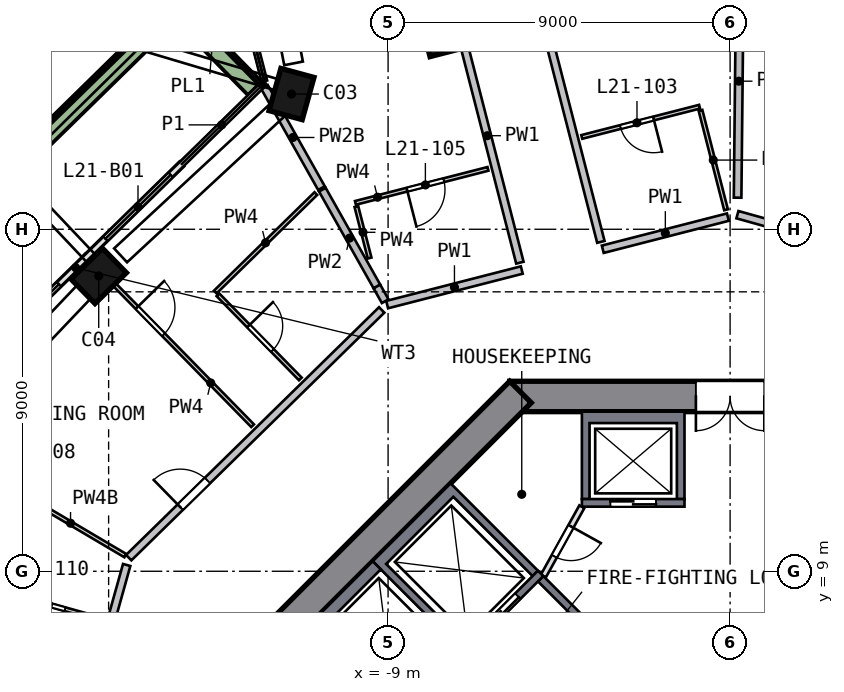
"""IFC4 building model, lengths in metres.
Left out: names, types, materials, properties, quantities, classifications, styles, units other than length and angle.
Written with IfcOpenShell. Run it as: python <this file> out.ifc"""

import sys

from ifc_helpers import new_model, si_unit, direction, frame, frame_2d, origin, origin_2d, place, context, subcontext, project, spatial, polyline, rectangle, outline, extrude, element, fill, save


model = new_model("IFC4")
c1 = context("Model", 3, precision=1e-05, world=origin(), true_north=direction((0.0, 1.0)))
c2 = subcontext(c1, "Body", "Model", "MODEL_VIEW")
j1 = project(units=[si_unit("LENGTHUNIT", "METRE"), si_unit("PLANEANGLEUNIT", "RADIAN")], contexts=[c1])
p1 = place(None, origin())
s1 = spatial("IfcSite", under=j1, at=p1, CompositionType="ELEMENT")
p2 = place(p1, origin())
s2 = spatial("IfcBuilding", under=s1, at=p2, CompositionType="ELEMENT")
p3 = place(p2, frame((0.0, 0.0, 93.0)))
s3 = spatial("IfcBuildingStorey", under=s2, at=p3, CompositionType="ELEMENT", Elevation=93.0)
p4 = place(p3, frame((-11.417, 21.625, 0.0), z_axis=(-0.102392644, -0.055111111, 0.993216246), x_axis=(0.261860197, 0.961754302, 0.080361056)))
e1 = element("IfcColumn", 1, at=p4, inside=s3, PredefinedType="COLUMN", context=c2, shape_type="SweptSolid", body=[
    extrude(rectangle(XDim=1.15, YDim=0.9, at=origin_2d()), origin(), (0.0, 0.0, 1.0), 3.212),
])
p5 = place(p3, frame((-16.518, 16.867, 0.0), z_axis=(-0.079548847, -0.079244645, 0.993676138), x_axis=(-0.709905463, -0.695289434, -0.11228017)))
e2 = element("IfcColumn", 2, at=p5, inside=s3, PredefinedType="COLUMN", context=c2, shape_type="SweptSolid", body=[
    extrude(rectangle(XDim=1.15, YDim=0.9, at=origin_2d()), origin(), (0.0, 0.0, 1.0), 3.21),
])
p6 = place(p3, frame((-7.437, 23.135, 0.0), z_axis=(-0.109699705, -0.03626248, 0.993303079), x_axis=(-0.249411802, 0.968366047, 0.007807238)))
e3 = element("IfcColumn", 3, at=p6, inside=s3, PredefinedType="COLUMN", context=c2, shape_type="SweptSolid", body=[
    extrude(rectangle(XDim=0.9, YDim=0.9, at=origin_2d()), origin(), (0.0, 0.0, 1.0), 3.211),
])
p7 = place(p3, frame((5.799, 13.6, 0.0), z_axis=(0.0, 0.0, 1.0), x_axis=(-1.0, 0.0, 0.0)))
e4 = element("IfcWall", 4, at=p7, inside=s3, PredefinedType="SHEAR", context=c2, shape_type="SweptSolid", body=[
    extrude(rectangle(XDim=11.598, YDim=0.8, at=frame_2d((5.799, 0.0))), origin(), (0.0, 0.0, 1.0), 3.5),
])
p8 = place(p7, frame((4.899, 0.0, 0.0)))
e5 = element("IfcOpeningElement", 5, at=p8, cuts=e4, PredefinedType="OPENING", context=c2, shape_type="SweptSolid", body=[
    extrude(rectangle(XDim=1.8, YDim=2.1, at=frame_2d((0.9, 1.05))), frame((0.0, 0.41, 0.0), z_axis=(0.0, -1.0, 0.0), x_axis=(1.0, 0.0, 0.0)), (0.0, 0.0, 1.0), 0.82),
])
p9 = place(p3, frame((-5.516, 13.717, 0.0), z_axis=(0.0, 0.0, 1.0), x_axis=(-0.707106781, -0.707106781, 0.0)))
e6 = element("IfcWall", 6, at=p9, inside=s3, PredefinedType="SHEAR", context=c2, shape_type="SweptSolid", body=[
    extrude(rectangle(XDim=11.598, YDim=0.8, at=frame_2d((5.799, 0.0))), origin(), (0.0, 0.0, 1.0), 3.5),
])
p10 = place(p3, frame((-14.438, 19.71, 0.0), z_axis=(0.0, 0.0, 1.0), x_axis=(-0.714445304, -0.699691295, 0.0)))
e7 = element("IfcWall", 7, at=p10, inside=s3, PredefinedType="SOLIDWALL", context=c2, shape_type="SweptSolid", body=[
    extrude(rectangle(XDim=3.475, YDim=0.15, at=frame_2d((1.737, 0.0))), origin(), (0.0, 0.0, 1.0), 2.425),
])
p11 = place(p10, frame((0.4, 0.0, 0.0)))
e8 = element("IfcOpeningElement", 8, at=p11, cuts=e7, PredefinedType="OPENING", context=c2, shape_type="SweptSolid", body=[
    extrude(rectangle(XDim=2.4, YDim=2.4, at=frame_2d((1.2, 1.2))), frame((0.0, 0.085, 0.0), z_axis=(0.0, -1.0, 0.0), x_axis=(1.0, 0.0, 0.0)), (0.0, 0.0, 1.0), 0.17),
])
p12 = place(p3, frame((-16.92, 17.278, 0.0), z_axis=(0.0, 0.0, 1.0), x_axis=(-0.714483248, -0.699652549, 0.0)))
e9 = element("IfcWall", 9, at=p12, inside=s3, PredefinedType="SOLIDWALL", context=c2, shape_type="SweptSolid", body=[
    extrude(rectangle(XDim=3.836, YDim=0.15, at=frame_2d((1.918, 0.0))), origin(), (0.0, 0.0, 1.0), 2.425),
])
p13 = place(p12, frame((1.035, 0.0, 0.0)))
e10 = element("IfcOpeningElement", 10, at=p13, cuts=e9, PredefinedType="OPENING", context=c2, shape_type="SweptSolid", body=[
    extrude(rectangle(XDim=2.4, YDim=2.4, at=frame_2d((1.2, 1.2))), frame((0.0, 0.085, 0.0), z_axis=(0.0, -1.0, 0.0), x_axis=(1.0, 0.0, 0.0)), (0.0, 0.0, 1.0), 0.17),
])
p14 = place(p3, frame((-12.508, 21.706, 0.0), z_axis=(0.0, 0.0, 1.0), x_axis=(-0.699665376, 0.714470686, 0.0)))
e11 = element("IfcWall", 11, at=p14, inside=s3, PredefinedType="SOLIDWALL", context=c2, shape_type="SweptSolid", body=[
    extrude(rectangle(XDim=3.199, YDim=0.5, at=frame_2d((1.6, 0.0))), origin(), (0.0, 0.0, 1.0), 0.7),
])
p15 = place(p3, frame((-14.75, 23.638, 0.0), z_axis=(0.0, 0.0, 1.0), x_axis=(-0.714471394, -0.699664653, 0.0)))
e12 = element("IfcWall", 12, at=p15, inside=s3, PredefinedType="SOLIDWALL", context=c2, shape_type="SweptSolid", body=[
    extrude(rectangle(XDim=13.224, YDim=0.5, at=frame_2d((6.612, 0.0))), origin(), (0.0, 0.0, 1.0), 0.7),
])
p16 = place(p3, origin())
e13 = element("IfcWall", 13, at=p16, inside=s3, PredefinedType="SOLIDWALL", context=c2, shape_type="SweptSolid", body=[
    extrude(outline(polyline([(-3.9, 10.9), (-3.9, 13.2), (-1.2, 13.2), (-1.2, 10.9), (-1.4, 10.9), (-1.4, 12.9), (-3.7, 12.9), (-3.7, 10.9), (-3.9, 10.9)])), origin(), (0.0, 0.0, 1.0), 3.19),
])
p17 = place(p3, frame((-1.2, 10.8, 0.0), z_axis=(0.0, 0.0, 1.0), x_axis=(-1.0, 0.0, 0.0)))
e14 = element("IfcWall", 14, at=p17, inside=s3, PredefinedType="SOLIDWALL", context=c2, shape_type="SweptSolid", body=[
    extrude(rectangle(XDim=2.7, YDim=0.2, at=frame_2d((1.35, 0.0))), origin(), (0.0, 0.0, 1.0), 3.19),
])
p18 = place(p17, frame((0.75, 0.0, 0.0)))
e15 = element("IfcOpeningElement", 15, at=p18, cuts=e14, PredefinedType="OPENING", context=c2, shape_type="SweptSolid", body=[
    extrude(rectangle(XDim=1.2, YDim=2.1, at=frame_2d((0.6, 1.05))), frame((0.0, 0.11, 0.0), z_axis=(0.0, -1.0, 0.0), x_axis=(1.0, 0.0, 0.0)), (0.0, 0.0, 1.0), 0.22),
])
p19 = place(p3, origin())
e16 = element("IfcWall", 16, at=p19, inside=s3, PredefinedType="SOLIDWALL", context=c2, shape_type="SweptSolid", body=[
    extrude(outline(polyline([(-9.405, 9.263), (-7.354, 11.314), (-5.056, 9.016), (-5.197, 8.874), (-7.283, 10.96), (-9.051, 9.192), (-6.965, 7.106), (-7.106, 6.965), (-9.405, 9.263)])), origin(), (0.0, 0.0, 1.0), 3.19),
])
p20 = place(p3, frame((-4.985, 8.945, 0.0), z_axis=(0.0, 0.0, 1.0), x_axis=(-0.707106781, -0.707106781, 0.0)))
e17 = element("IfcWall", 17, at=p20, inside=s3, PredefinedType="SOLIDWALL", context=c2, shape_type="SweptSolid", body=[
    extrude(rectangle(XDim=2.9, YDim=0.2, at=frame_2d((1.45, 0.0))), origin(), (0.0, 0.0, 1.0), 3.19),
])
p21 = place(p20, frame((0.85, 0.0, 0.0)))
e18 = element("IfcOpeningElement", 18, at=p21, cuts=e17, PredefinedType="OPENING", context=c2, shape_type="SweptSolid", body=[
    extrude(rectangle(XDim=1.2, YDim=2.1, at=frame_2d((0.6, 1.05))), frame((0.0, 0.11, 0.0), z_axis=(0.0, -1.0, 0.0), x_axis=(1.0, 0.0, 0.0)), (0.0, 0.0, 1.0), 0.22),
])
p22 = place(p3, origin())
e19 = element("IfcWall", 19, at=p22, inside=s3, PredefinedType="SOLIDWALL", context=c2, shape_type="SweptSolid", body=[
    extrude(outline(polyline([(-11.314, 7.354), (-9.405, 9.263), (-9.192, 9.051), (-10.96, 7.283), (-8.874, 5.197), (-9.016, 5.056), (-11.314, 7.354)])), origin(), (0.0, 0.0, 1.0), 3.19),
])
p23 = place(p3, frame((-3.005, 6.823, 0.0), z_axis=(0.0, 0.0, 1.0), x_axis=(-0.707106781, 0.707106781, 0.0)))
e20 = element("IfcWall", 20, at=p23, inside=s3, PredefinedType="SOLIDWALL", context=c2, shape_type="SweptSolid", body=[
    extrude(rectangle(XDim=2.8, YDim=0.2, at=frame_2d((1.4, 0.0))), origin(), (0.0, 0.0, 1.0), 3.19),
])
p24 = place(p3, frame((-3.9, 10.7, 0.0), z_axis=(0.0, 0.0, 1.0), x_axis=(-0.485692555, -0.874129705, 0.0)))
e21 = element("IfcWall", 21, at=p24, inside=s3, PredefinedType="PARTITIONING", context=c2, shape_type="SweptSolid", body=[
    extrude(rectangle(XDim=2.089, YDim=0.15, at=frame_2d((1.044, 0.0))), origin(), (0.0, 0.0, 1.0), 3.19),
])
p25 = place(p24, frame((0.594, 0.0, 0.0)))
e22 = element("IfcOpeningElement", 22, at=p25, cuts=e21, PredefinedType="OPENING", context=c2, shape_type="SweptSolid", body=[
    extrude(rectangle(XDim=0.9, YDim=2.1, at=frame_2d((0.45, 1.05))), frame((0.0, 0.085, 0.0), z_axis=(0.0, -1.0, 0.0), x_axis=(1.0, 0.0, 0.0)), (0.0, 0.0, 1.0), 0.17),
])
p26 = place(p3, frame((-18.33, 0.386, 0.0), z_axis=(0.0, 0.0, 1.0), x_axis=(0.268911641, 0.96316485, 0.0)))
e23 = element("IfcWall", 23, at=p26, inside=s3, PredefinedType="SOLIDWALL", context=c2, shape_type="SweptSolid", body=[
    extrude(rectangle(XDim=9.116, YDim=0.2, at=frame_2d((4.558, 0.0))), origin(), (0.0, 0.0, 1.0), 3.19),
])
p27 = place(p26, frame((0.2, 0.0, 0.0)))
e24 = element("IfcOpeningElement", 24, at=p27, cuts=e23, PredefinedType="OPENING", context=c2, shape_type="SweptSolid", body=[
    extrude(rectangle(XDim=1.0, YDim=2.1, at=frame_2d((0.5, 1.05))), frame((0.0, 0.11, 0.0), z_axis=(0.0, -1.0, 0.0), x_axis=(1.0, 0.0, 0.0)), (0.0, 0.0, 1.0), 0.22),
])
p28 = place(p3, frame((-15.824, 9.359, 0.0), z_axis=(0.0, 0.0, 1.0), x_axis=(0.714458026, 0.699678304, 0.0)))
e25 = element("IfcWall", 25, at=p28, inside=s3, PredefinedType="SOLIDWALL", context=c2, shape_type="SweptSolid", body=[
    extrude(rectangle(XDim=9.316, YDim=0.2, at=frame_2d((4.658, 0.0))), origin(), (0.0, 0.0, 1.0), 3.19),
])
p29 = place(p28, frame((1.9, 0.0, 0.0)))
e26 = element("IfcOpeningElement", 26, at=p29, cuts=e25, PredefinedType="OPENING", context=c2, shape_type="SweptSolid", body=[
    extrude(rectangle(XDim=1.0, YDim=2.1, at=frame_2d((0.5, 1.05))), frame((0.0, 0.11, 0.0), z_axis=(0.0, -1.0, 0.0), x_axis=(1.0, 0.0, 0.0)), (0.0, 0.0, 1.0), 0.22),
])
p30 = place(p3, frame((-5.482, 16.927, 0.0), z_axis=(0.0, 0.0, 1.0), x_axis=(-0.968576117, -0.24871732, 0.0)))
e27 = element("IfcWall", 27, at=p30, inside=s3, PredefinedType="SOLIDWALL", context=c2, shape_type="SweptSolid", body=[
    extrude(rectangle(XDim=3.658, YDim=0.2, at=frame_2d((1.829, 0.0))), origin(), (0.0, 0.0, 1.0), 3.19),
])
p31 = place(p3, frame((-5.531, 17.121, 0.0), z_axis=(0.0, 0.0, 1.0), x_axis=(-0.24868755, 0.968583761, 0.0)))
e28 = element("IfcWall", 28, at=p31, inside=s3, PredefinedType="SOLIDWALL", context=c2, shape_type="SweptSolid", body=[
    extrude(rectangle(XDim=12.624, YDim=0.2, at=frame_2d((6.312, 0.0))), origin(), (0.0, 0.0, 1.0), 3.19),
])
p32 = place(p31, frame((7.1, 0.0, 0.0)))
e29 = element("IfcOpeningElement", 29, at=p32, cuts=e28, PredefinedType="OPENING", context=c2, shape_type="SweptSolid", body=[
    extrude(rectangle(XDim=1.0, YDim=2.1, at=frame_2d((0.5, 1.05))), frame((0.0, 0.11, 0.0), z_axis=(0.0, -1.0, 0.0), x_axis=(1.0, 0.0, 0.0)), (0.0, 0.0, 1.0), 0.22),
])
p33 = place(p3, frame((-3.401, 17.668, 0.0), z_axis=(0.0, 0.0, 1.0), x_axis=(-0.24868755, 0.968583761, 0.0)))
e30 = element("IfcWall", 30, at=p33, inside=s3, PredefinedType="SOLIDWALL", context=c2, shape_type="SweptSolid", body=[
    extrude(rectangle(XDim=12.624, YDim=0.2, at=frame_2d((6.312, 0.0))), origin(), (0.0, 0.0, 1.0), 3.19),
])
p34 = place(p3, frame((-0.058, 18.32, 0.0), z_axis=(0.0, 0.0, 1.0), x_axis=(-0.968589847, -0.248663847, 0.0)))
e31 = element("IfcWall", 31, at=p34, inside=s3, PredefinedType="SOLIDWALL", context=c2, shape_type="SweptSolid", body=[
    extrude(rectangle(XDim=3.4, YDim=0.2, at=frame_2d((1.7, 0.0))), origin(), (0.0, 0.0, 1.0), 3.19),
])
p35 = place(p3, frame((0.193, 18.384, 0.0), z_axis=(0.0, 0.0, 1.0), x_axis=(0.963159453, -0.268930974, 0.0)))
e32 = element("IfcWall", 32, at=p35, inside=s3, PredefinedType="SOLIDWALL", context=c2, shape_type="SweptSolid", body=[
    extrude(rectangle(XDim=9.537, YDim=0.2, at=frame_2d((4.768, 0.0))), origin(), (0.0, 0.0, 1.0), 3.19),
])
p36 = place(p35, frame((5.1, 0.0, 0.0)))
e33 = element("IfcOpeningElement", 33, at=p36, cuts=e32, PredefinedType="OPENING", context=c2, shape_type="SweptSolid", body=[
    extrude(rectangle(XDim=1.0, YDim=2.1, at=frame_2d((0.5, 1.05))), frame((0.0, 0.11, 0.0), z_axis=(0.0, -1.0, 0.0), x_axis=(1.0, 0.0, 0.0)), (0.0, 0.0, 1.0), 0.22),
])
p37 = place(p3, frame((-10.752, 19.082, 0.0), z_axis=(0.0, 0.0, 1.0), x_axis=(-0.490847997, 0.871245226, 0.0)))
e34 = element("IfcWall", 34, at=p37, inside=s3, PredefinedType="SOLIDWALL", context=c2, shape_type="SweptSolid", body=[
    extrude(rectangle(XDim=3.062, YDim=0.2, at=frame_2d((1.531, 0.0))), origin(), (0.0, 0.0, 1.0), 2.69),
])
p38 = place(p3, frame((-9.294, 16.494, 0.0), z_axis=(0.0, 0.0, 1.0), x_axis=(-0.490843734, 0.871247628, 0.0)))
e35 = element("IfcWall", 35, at=p38, inside=s3, PredefinedType="SOLIDWALL", context=c2, shape_type="SweptSolid", body=[
    extrude(rectangle(XDim=2.925, YDim=0.2, at=frame_2d((1.462, 0.0))), origin(), (0.0, 0.0, 1.0), 3.19),
])
p39 = place(p3, frame((-9.076, 16.107, 0.0), z_axis=(0.0, 0.0, 1.0), x_axis=(-0.491331889, 0.870972431, 0.0)))
e36 = element("IfcWall", 36, at=p39, inside=s3, PredefinedType="SOLIDWALL", context=c2, shape_type="SweptSolid", body=[
    extrude(rectangle(XDim=0.444, YDim=0.2, at=frame_2d((0.222, 0.0))), origin(), (0.0, 0.0, 1.0), 3.19),
])
p40 = place(p3, frame((0.261, 24.963, 0.0), z_axis=(0.0, 0.0, 1.0), x_axis=(-0.010471255, -0.999945175, 0.0)))
e37 = element("IfcWall", 37, at=p40, inside=s3, PredefinedType="SOLIDWALL", context=c2, shape_type="SweptSolid", body=[
    extrude(rectangle(XDim=6.132, YDim=0.2, at=frame_2d((3.066, 0.0))), origin(), (0.0, 0.0, 1.0), 3.19),
])
p41 = place(p3, frame((-15.914, 9.411, 0.0), z_axis=(0.0, 0.0, 1.0), x_axis=(-0.860735822, 0.509051908, 0.0)))
e38 = element("IfcWall", 38, at=p41, inside=s3, PredefinedType="PARTITIONING", context=c2, shape_type="SweptSolid", body=[
    extrude(rectangle(XDim=6.476, YDim=0.1, at=frame_2d((3.238, 0.0))), origin(), (0.0, 0.0, 1.0), 2.69),
])
p42 = place(p41, frame((3.55, 0.0, 0.0)))
e39 = element("IfcOpeningElement", 39, at=p42, cuts=e38, PredefinedType="OPENING", context=c2, shape_type="SweptSolid", body=[
    extrude(rectangle(XDim=1.0, YDim=2.1, at=frame_2d((0.5, 1.05))), frame((0.0, 0.06, 0.0), z_axis=(0.0, -1.0, 0.0), x_axis=(1.0, 0.0, 0.0)), (0.0, 0.0, 1.0), 0.12),
])
p43 = place(p3, frame((-16.49, 7.719, 0.0), z_axis=(0.0, 0.0, 1.0), x_axis=(-0.963161842, 0.268922415, 0.0)))
e40 = element("IfcWall", 40, at=p43, inside=s3, PredefinedType="PARTITIONING", context=c2, shape_type="SweptSolid", body=[
    extrude(rectangle(XDim=3.2, YDim=0.1, at=frame_2d((1.6, 0.0))), origin(), (0.0, 0.0, 1.0), 3.19),
])
p44 = place(p43, frame((1.05, 0.0, 0.0)))
e41 = element("IfcOpeningElement", 41, at=p44, cuts=e40, PredefinedType="OPENING", context=c2, shape_type="SweptSolid", body=[
    extrude(rectangle(XDim=0.9, YDim=2.1, at=frame_2d((0.45, 1.05))), frame((0.0, 0.06, 0.0), z_axis=(0.0, -1.0, 0.0), x_axis=(1.0, 0.0, 0.0)), (0.0, 0.0, 1.0), 0.12),
])
p45 = place(p3, frame((-16.868, 17.225, 0.0), z_axis=(0.0, 0.0, 1.0), x_axis=(0.699684325, -0.71445213, 0.0)))
e42 = element("IfcWall", 42, at=p45, inside=s3, PredefinedType="PARTITIONING", context=c2, shape_type="SweptSolid", body=[
    extrude(rectangle(XDim=6.15, YDim=0.1, at=frame_2d((3.075, 0.0))), origin(), (0.0, 0.0, 1.0), 3.19),
])
p46 = place(p45, frame((1.8, 0.0, 0.0)))
e43 = element("IfcOpeningElement", 43, at=p46, cuts=e42, PredefinedType="OPENING", context=c2, shape_type="SweptSolid", body=[
    extrude(rectangle(XDim=1.0, YDim=2.1, at=frame_2d((0.5, 1.05))), frame((0.0, 0.06, 0.0), z_axis=(0.0, -1.0, 0.0), x_axis=(1.0, 0.0, 0.0)), (0.0, 0.0, 1.0), 0.12),
])
p47 = place(p3, frame((-13.478, 16.276, 0.0), z_axis=(0.0, 0.0, 1.0), x_axis=(0.699664998, -0.714471056, 0.0)))
e44 = element("IfcWall", 44, at=p47, inside=s3, PredefinedType="PARTITIONING", context=c2, shape_type="SweptSolid", body=[
    extrude(rectangle(XDim=3.1, YDim=0.1, at=frame_2d((1.55, 0.0))), origin(), (0.0, 0.0, 1.0), 3.19),
])
p48 = place(p47, frame((1.15, 0.0, 0.0)))
e45 = element("IfcOpeningElement", 45, at=p48, cuts=e44, PredefinedType="OPENING", context=c2, shape_type="SweptSolid", body=[
    extrude(rectangle(XDim=0.9, YDim=2.1, at=frame_2d((0.45, 1.05))), frame((0.0, 0.06, 0.0), z_axis=(0.0, -1.0, 0.0), x_axis=(1.0, 0.0, 0.0)), (0.0, 0.0, 1.0), 0.12),
])
p49 = place(p3, frame((-10.901, 18.939, 0.0), z_axis=(0.0, 0.0, 1.0), x_axis=(-0.714515918, -0.699619184, 0.0)))
e46 = element("IfcWall", 46, at=p49, inside=s3, PredefinedType="PARTITIONING", context=c2, shape_type="SweptSolid", body=[
    extrude(rectangle(XDim=3.704, YDim=0.1, at=frame_2d((1.852, 0.0))), origin(), (0.0, 0.0, 1.0), 3.19),
])
p50 = place(p3, frame((-9.486, 17.242, 0.0), z_axis=(0.0, 0.0, 1.0), x_axis=(-0.248610566, 0.968603524, 0.0)))
e47 = element("IfcWall", 47, at=p50, inside=s3, PredefinedType="PARTITIONING", context=c2, shape_type="SweptSolid", body=[
    extrude(rectangle(XDim=1.398, YDim=0.1, at=frame_2d((0.699, 0.0))), origin(), (0.0, 0.0, 1.0), 3.19),
])
p51 = place(p3, frame((-6.372, 19.589, 0.0), z_axis=(0.0, 0.0, 1.0), x_axis=(-0.968583069, -0.248690247, 0.0)))
e48 = element("IfcWall", 48, at=p51, inside=s3, PredefinedType="PARTITIONING", context=c2, shape_type="SweptSolid", body=[
    extrude(rectangle(XDim=3.6, YDim=0.1, at=frame_2d((1.8, 0.0))), origin(), (0.0, 0.0, 1.0), 3.19),
])
p52 = place(p51, frame((1.2, 0.0, 0.0)))
e49 = element("IfcOpeningElement", 49, at=p52, cuts=e48, PredefinedType="OPENING", context=c2, shape_type="SweptSolid", body=[
    extrude(rectangle(XDim=1.0, YDim=2.1, at=frame_2d((0.5, 1.05))), frame((0.0, 0.06, 0.0), z_axis=(0.0, -1.0, 0.0), x_axis=(1.0, 0.0, 0.0)), (0.0, 0.0, 1.0), 0.12),
])
p53 = place(p3, frame((-0.804, 21.225, 0.0), z_axis=(0.0, 0.0, 1.0), x_axis=(-0.968579095, -0.248705722, 0.0)))
e50 = element("IfcWall", 50, at=p53, inside=s3, PredefinedType="PARTITIONING", context=c2, shape_type="SweptSolid", body=[
    extrude(rectangle(XDim=3.2, YDim=0.1, at=frame_2d((1.6, 0.0))), origin(), (0.0, 0.0, 1.0), 3.19),
])
p54 = place(p53, frame((1.25, 0.0, 0.0)))
e51 = element("IfcOpeningElement", 51, at=p54, cuts=e50, PredefinedType="OPENING", context=c2, shape_type="SweptSolid", body=[
    extrude(rectangle(XDim=0.9, YDim=2.1, at=frame_2d((0.45, 1.05))), frame((0.0, 0.06, 0.0), z_axis=(0.0, -1.0, 0.0), x_axis=(1.0, 0.0, 0.0)), (0.0, 0.0, 1.0), 0.12),
])
p55 = place(p3, frame((-0.107, 18.513, 0.0), z_axis=(0.0, 0.0, 1.0), x_axis=(-0.24865815, 0.968591309, 0.0)))
e52 = element("IfcWall", 52, at=p55, inside=s3, PredefinedType="PARTITIONING", context=c2, shape_type="SweptSolid", body=[
    extrude(rectangle(XDim=2.7, YDim=0.1, at=frame_2d((1.35, 0.0))), origin(), (0.0, 0.0, 1.0), 3.19),
])
p56 = place(p11, origin())
e53 = element("IfcDoor", 53, at=p56, inside=s3, OperationType="SLIDING_TO_RIGHT", PredefinedType="DOOR", context=c2, shape_type="SweptSolid", body=[
    extrude(rectangle(XDim=2.4, YDim=2.4, at=frame_2d((1.2, 1.2))), frame((0.0, 0.025, 0.0), z_axis=(0.0, -1.0, 0.0), x_axis=(1.0, 0.0, 0.0)), (0.0, 0.0, 1.0), 0.05),
])
fill(e8, e53)
p57 = place(p13, origin())
e54 = element("IfcDoor", 54, at=p57, inside=s3, OperationType="SLIDING_TO_LEFT", PredefinedType="DOOR", context=c2, shape_type="SweptSolid", body=[
    extrude(rectangle(XDim=2.4, YDim=2.4, at=frame_2d((1.2, 1.2))), frame((0.0, 0.025, 0.0), z_axis=(0.0, -1.0, 0.0), x_axis=(1.0, 0.0, 0.0)), (0.0, 0.0, 1.0), 0.05),
])
fill(e10, e54)
p58 = place(p18, origin())
e55 = element("IfcDoor", 55, at=p58, inside=s3, OperationType="DOUBLE_DOOR_SLIDING", PredefinedType="DOOR", context=c2, shape_type="SweptSolid", body=[
    extrude(rectangle(XDim=1.2, YDim=2.1, at=frame_2d((0.6, 1.05))), frame((0.0, 0.025, 0.0), z_axis=(0.0, -1.0, 0.0), x_axis=(1.0, 0.0, 0.0)), (0.0, 0.0, 1.0), 0.05),
])
fill(e15, e55)
p59 = place(p21, origin())
e56 = element("IfcDoor", 56, at=p59, inside=s3, OperationType="DOUBLE_DOOR_SLIDING", PredefinedType="DOOR", context=c2, shape_type="SweptSolid", body=[
    extrude(rectangle(XDim=1.2, YDim=2.1, at=frame_2d((0.6, 1.05))), frame((0.0, 0.025, 0.0), z_axis=(0.0, -1.0, 0.0), x_axis=(1.0, 0.0, 0.0)), (0.0, 0.0, 1.0), 0.05),
])
fill(e18, e56)
p60 = place(p8, origin())
e57 = element("IfcDoor", 57, at=p60, inside=s3, OperationType="DOUBLE_DOOR_SINGLE_SWING", PredefinedType="DOOR", context=c2, shape_type="SweptSolid", body=[
    extrude(rectangle(XDim=1.8, YDim=2.1, at=frame_2d((0.9, 1.05))), frame((0.0, 0.025, 0.0), z_axis=(0.0, -1.0, 0.0), x_axis=(1.0, 0.0, 0.0)), (0.0, 0.0, 1.0), 0.05),
])
fill(e5, e57)
p61 = place(p25, origin())
e58 = element("IfcDoor", 58, at=p61, inside=s3, OperationType="SINGLE_SWING_LEFT", PredefinedType="DOOR", context=c2, shape_type="SweptSolid", body=[
    extrude(rectangle(XDim=0.9, YDim=2.1, at=frame_2d((0.45, 1.05))), frame((0.0, 0.025, 0.0), z_axis=(0.0, -1.0, 0.0), x_axis=(1.0, 0.0, 0.0)), (0.0, 0.0, 1.0), 0.05),
])
fill(e22, e58)
p62 = place(p54, origin())
e59 = element("IfcDoor", 59, at=p62, inside=s3, OperationType="SINGLE_SWING_LEFT", PredefinedType="DOOR", context=c2, shape_type="SweptSolid", body=[
    extrude(rectangle(XDim=0.9, YDim=2.1, at=frame_2d((0.45, 1.05))), frame((0.0, 0.025, 0.0), z_axis=(0.0, -1.0, 0.0), x_axis=(1.0, 0.0, 0.0)), (0.0, 0.0, 1.0), 0.05),
])
fill(e51, e59)
p63 = place(p52, origin())
e60 = element("IfcDoor", 60, at=p63, inside=s3, OperationType="SINGLE_SWING_RIGHT", PredefinedType="DOOR", context=c2, shape_type="SweptSolid", body=[
    extrude(rectangle(XDim=1.0, YDim=2.1, at=frame_2d((0.5, 1.05))), frame((0.0, 0.025, 0.0), z_axis=(0.0, -1.0, 0.0), x_axis=(1.0, 0.0, 0.0)), (0.0, 0.0, 1.0), 0.05),
])
fill(e49, e60)
p64 = place(p29, origin())
e61 = element("IfcDoor", 61, at=p64, inside=s3, OperationType="SINGLE_SWING_LEFT", PredefinedType="DOOR", context=c2, shape_type="SweptSolid", body=[
    extrude(rectangle(XDim=1.0, YDim=2.1, at=frame_2d((0.5, 1.05))), frame((0.0, 0.025, 0.0), z_axis=(0.0, -1.0, 0.0), x_axis=(1.0, 0.0, 0.0)), (0.0, 0.0, 1.0), 0.05),
])
fill(e26, e61)
p65 = place(p46, origin())
e62 = element("IfcDoor", 62, at=p65, inside=s3, OperationType="SINGLE_SWING_LEFT", PredefinedType="DOOR", context=c2, shape_type="SweptSolid", body=[
    extrude(rectangle(XDim=1.0, YDim=2.1, at=frame_2d((0.5, 1.05))), frame((0.0, 0.025, 0.0), z_axis=(0.0, -1.0, 0.0), x_axis=(1.0, 0.0, 0.0)), (0.0, 0.0, 1.0), 0.05),
])
fill(e43, e62)
p66 = place(p48, origin())
e63 = element("IfcDoor", 63, at=p66, inside=s3, OperationType="SINGLE_SWING_LEFT", PredefinedType="DOOR", context=c2, shape_type="SweptSolid", body=[
    extrude(rectangle(XDim=0.9, YDim=2.1, at=frame_2d((0.45, 1.05))), frame((0.0, 0.025, 0.0), z_axis=(0.0, -1.0, 0.0), x_axis=(1.0, 0.0, 0.0)), (0.0, 0.0, 1.0), 0.05),
])
fill(e45, e63)
p67 = place(p44, origin())
e64 = element("IfcDoor", 64, at=p67, inside=s3, OperationType="SINGLE_SWING_RIGHT", PredefinedType="DOOR", context=c2, shape_type="SweptSolid", body=[
    extrude(rectangle(XDim=0.9, YDim=2.1, at=frame_2d((0.45, 1.05))), frame((0.0, 0.025, 0.0), z_axis=(0.0, -1.0, 0.0), x_axis=(1.0, 0.0, 0.0)), (0.0, 0.0, 1.0), 0.05),
])
fill(e41, e64)
save(model, sys.argv[1])
